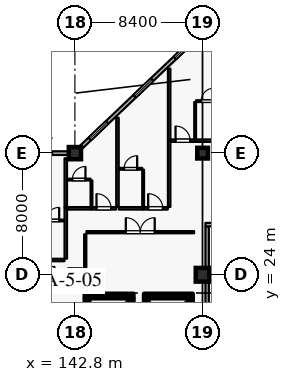
"""IFC4 building model, lengths in metres.
Left out: names, types, materials, properties, quantities, classifications, styles, units other than length and angle.
Written with IfcOpenShell. Run it as: python <this file> out.ifc"""

import sys

from ifc_helpers import new_model, si_unit, direction, frame, frame_2d, origin, origin_2d, place, context, subcontext, project, spatial, rectangle, extrude, element, fill, save


model = new_model("IFC4")
c1 = context("Model", 3, precision=1e-05, world=origin(), true_north=direction((0.0, 1.0)))
c2 = subcontext(c1, "Body", "Model", "MODEL_VIEW")
j1 = project(units=[si_unit("LENGTHUNIT", "METRE"), si_unit("PLANEANGLEUNIT", "RADIAN")], contexts=[c1])
p1 = place(None, origin())
s1 = spatial("IfcSite", under=j1, at=p1, CompositionType="ELEMENT")
p2 = place(p1, origin())
s2 = spatial("IfcBuilding", under=s1, at=p2, CompositionType="ELEMENT")
p3 = place(p2, frame((0.0, 0.0, 21.0)))
s3 = spatial("IfcBuildingStorey", under=s2, at=p3, CompositionType="ELEMENT", Elevation=21.0)
p4 = place(p3, frame((142.8, 32.0, 0.0), z_axis=(0.0, 0.0, 1.0), x_axis=(1.0, 0.0, 0.0)))
e1 = element("IfcColumn", 1, at=p4, inside=s3, PredefinedType="COLUMN", context=c2, shape_type="SweptSolid", body=[
    extrude(rectangle(XDim=0.8, YDim=0.8, at=origin_2d()), origin(), (0.0, 0.0, 1.0), 4.2),
])
p5 = place(p3, frame((151.2, 24.0, 0.0), z_axis=(0.0, 0.0, 1.0), x_axis=(1.0, 0.0, 0.0)))
e2 = element("IfcColumn", 2, at=p5, inside=s3, PredefinedType="COLUMN", context=c2, shape_type="SweptSolid", body=[
    extrude(rectangle(XDim=0.9, YDim=0.9, at=origin_2d()), origin(), (0.0, 0.0, 1.0), 4.2),
])
for number, where, z_axis, x_axis in (
    (3, (142.8, 24.0, 0.0), (0.0, 0.0, 1.0), (1.0, 0.0, 0.0)),
    (4, (151.2, 32.0, 0.0), (0.0, 0.0, 1.0), (1.0, 0.0, 0.0)),
):
    element("IfcColumn", number, at=place(p3, frame(where, z_axis=z_axis, x_axis=x_axis)), inside=s3, PredefinedType="COLUMN", context=c2, shape_type="SweptSolid", body=[
        extrude(rectangle(XDim=0.7, YDim=0.7, at=origin_2d()), origin(), (0.0, 0.0, 1.0), 4.2),
    ])
p6 = place(p3, frame((134.8, 32.0, 0.0), z_axis=(0.0, 0.0, 1.0), x_axis=(1.0, 0.0, 0.0)))
e5 = element("IfcWall", 5, at=p6, inside=s3, PredefinedType="SOLIDWALL", context=c2, shape_type="SweptSolid", body=[
    extrude(rectangle(XDim=7.6, YDim=0.24, at=frame_2d((3.8, 0.0))), origin(), (0.0, 0.0, 1.0), 3.53),
])
p7 = place(p6, frame((1.5, 0.0, 0.8)))
e6 = element("IfcOpeningElement", 6, at=p7, cuts=e5, PredefinedType="OPENING", context=c2, shape_type="SweptSolid", body=[
    extrude(rectangle(XDim=1.6, YDim=1.6, at=frame_2d((0.8, 0.8))), frame((0.0, 0.13, 0.0), z_axis=(0.0, -1.0, 0.0), x_axis=(1.0, 0.0, 0.0)), (0.0, 0.0, 1.0), 0.26),
])
p8 = place(p6, frame((4.9, 0.0, 0.8)))
e7 = element("IfcOpeningElement", 7, at=p8, cuts=e5, PredefinedType="OPENING", context=c2, shape_type="SweptSolid", body=[
    extrude(rectangle(XDim=1.6, YDim=1.6, at=frame_2d((0.8, 0.8))), frame((0.0, 0.13, 0.0), z_axis=(0.0, -1.0, 0.0), x_axis=(1.0, 0.0, 0.0)), (0.0, 0.0, 1.0), 0.26),
])
p9 = place(p3, frame((143.2, 32.381, 0.0), z_axis=(0.0, 0.0, 1.0), x_axis=(0.724156739794, 0.689635422677, 0.0)))
e8 = element("IfcWall", 8, at=p9, inside=s3, PredefinedType="SOLIDWALL", context=c2, shape_type="SweptSolid", body=[
    extrude(rectangle(XDim=10.495, YDim=0.24, at=frame_2d((5.248, 0.0))), origin(), (0.0, 0.0, 1.0), 3.53),
])
p10 = place(p9, frame((0.788, 0.0, 0.8)))
e9 = element("IfcOpeningElement", 9, at=p10, cuts=e8, PredefinedType="OPENING", context=c2, shape_type="SweptSolid", body=[
    extrude(rectangle(XDim=1.6, YDim=1.6, at=frame_2d((0.8, 0.8))), frame((0.0, 0.13, 0.0), z_axis=(0.0, -1.0, 0.0), x_axis=(1.0, 0.0, 0.0)), (0.0, 0.0, 1.0), 0.26),
])
p11 = place(p9, frame((4.862, 0.0, 0.8)))
e10 = element("IfcOpeningElement", 10, at=p11, cuts=e8, PredefinedType="OPENING", context=c2, shape_type="SweptSolid", body=[
    extrude(rectangle(XDim=1.6, YDim=1.6, at=frame_2d((0.8, 0.8))), frame((0.0, 0.13, 0.0), z_axis=(0.0, -1.0, 0.0), x_axis=(1.0, 0.0, 0.0)), (0.0, 0.0, 1.0), 0.26),
])
p12 = place(p9, frame((8.521, 0.0, 0.8)))
e11 = element("IfcOpeningElement", 11, at=p12, cuts=e8, PredefinedType="OPENING", context=c2, shape_type="SweptSolid", body=[
    extrude(rectangle(XDim=1.6, YDim=1.6, at=frame_2d((0.8, 0.8))), frame((0.0, 0.13, 0.0), z_axis=(0.0, -1.0, 0.0), x_axis=(1.0, 0.0, 0.0)), (0.0, 0.0, 1.0), 0.26),
])
p13 = place(p3, frame((146.5, 19.755, 0.0), z_axis=(0.0, 0.0, 1.0), x_axis=(0.0, 1.0, 0.0)))
e12 = element("IfcWall", 12, at=p13, inside=s3, PredefinedType="SHEAR", context=c2, shape_type="SweptSolid", body=[
    extrude(rectangle(XDim=2.69, YDim=0.3, at=frame_2d((1.345, 0.0))), origin(), (0.0, 0.0, 1.0), 3.965),
])
p14 = place(p3, frame((146.65, 22.6, 0.0), z_axis=(0.0, 0.0, 1.0), x_axis=(-1.0, 0.0, 0.0)))
e13 = element("IfcWall", 13, at=p14, inside=s3, PredefinedType="SHEAR", context=c2, shape_type="SweptSolid", body=[
    extrude(rectangle(XDim=3.2, YDim=0.3, at=frame_2d((1.6, 0.0))), origin(), (0.0, 0.0, 1.0), 3.965),
])
for number, where, z_axis, x_axis in (
    (14, (143.6, 22.445, 0.0), (0.0, 0.0, 1.0), (0.0, -1.0, 0.0)),
    (15, (150.4, 19.755, 0.0), (0.0, 0.0, 1.0), (0.0, 1.0, 0.0)),
):
    element("IfcWall", number, at=place(p3, frame(where, z_axis=z_axis, x_axis=x_axis)), inside=s3, PredefinedType="SHEAR", context=c2, shape_type="SweptSolid", body=[
        extrude(rectangle(XDim=2.69, YDim=0.3, at=frame_2d((1.345, 0.0))), origin(), (0.0, 0.0, 1.0), 3.965),
    ])
p15 = place(p3, frame((150.55, 22.6, 0.0), z_axis=(0.0, 0.0, 1.0), x_axis=(-1.0, 0.0, 0.0)))
e16 = element("IfcWall", 16, at=p15, inside=s3, PredefinedType="SHEAR", context=c2, shape_type="SweptSolid", body=[
    extrude(rectangle(XDim=3.2, YDim=0.3, at=frame_2d((1.6, 0.0))), origin(), (0.0, 0.0, 1.0), 3.965),
])
p16 = place(p3, frame((147.5, 22.445, 0.0), z_axis=(0.0, 0.0, 1.0), x_axis=(0.0, -1.0, 0.0)))
e17 = element("IfcWall", 17, at=p16, inside=s3, PredefinedType="SHEAR", context=c2, shape_type="SweptSolid", body=[
    extrude(rectangle(XDim=2.69, YDim=0.3, at=frame_2d((1.345, 0.0))), origin(), (0.0, 0.0, 1.0), 3.965),
])
p17 = place(p3, frame((151.5, 21.365, 0.0), z_axis=(0.0, 0.0, 1.0), x_axis=(0.0, 1.0, 0.0)))
e18 = element("IfcWall", 18, at=p17, inside=s3, PredefinedType="PARTITIONING", context=c2, shape_type="SweptSolid", body=[
    extrude(rectangle(XDim=5.82, YDim=0.22, at=frame_2d((2.91, 0.0))), origin(), (0.0, 0.0, 1.0), 3.965),
])
p18 = place(p3, frame((151.39, 27.3, 0.0), z_axis=(0.0, 0.0, 1.0), x_axis=(1.0, 0.0, 0.0)))
e19 = element("IfcWall", 19, at=p18, inside=s3, PredefinedType="PARTITIONING", context=c2, shape_type="SweptSolid", body=[
    extrude(rectangle(XDim=3.82, YDim=0.22, at=frame_2d((1.91, 0.0))), origin(), (0.0, 0.0, 1.0), 3.965),
])
p19 = place(p18, frame((1.35, 0.0, 0.0)))
e20 = element("IfcOpeningElement", 20, at=p19, cuts=e19, PredefinedType="OPENING", context=c2, shape_type="SweptSolid", body=[
    extrude(rectangle(XDim=1.12, YDim=2.2, at=frame_2d((0.56, 1.1))), frame((0.0, 0.12, 0.0), z_axis=(0.0, -1.0, 0.0), x_axis=(1.0, 0.0, 0.0)), (0.0, 0.0, 1.0), 0.24),
])
p20 = place(p3, frame((140.52, 24.97, 0.0), z_axis=(0.0, 0.0, 1.0), x_axis=(1.0, 0.0, 0.0)))
e21 = element("IfcWall", 21, at=p20, inside=s3, PredefinedType="PARTITIONING", context=c2, shape_type="SweptSolid", body=[
    extrude(rectangle(XDim=1.59, YDim=0.16, at=frame_2d((0.795, 0.0))), origin(), (0.0, 0.0, 1.0), 3.965),
])
p21 = place(p3, frame((140.57, 27.57, 0.0), z_axis=(0.0, 0.0, 1.0), x_axis=(1.0, 0.0, 0.0)))
e22 = element("IfcWall", 22, at=p21, inside=s3, PredefinedType="PARTITIONING", context=c2, shape_type="SweptSolid", body=[
    extrude(rectangle(XDim=1.53, YDim=0.115, at=frame_2d((0.765, 0.0))), origin(), (0.0, 0.0, 1.0), 3.965),
])
p22 = place(p21, frame((0.335, 0.0, 0.0)))
e23 = element("IfcOpeningElement", 23, at=p22, cuts=e22, PredefinedType="OPENING", context=c2, shape_type="SweptSolid", body=[
    extrude(rectangle(XDim=0.86, YDim=2.12, at=frame_2d((0.43, 1.06))), frame((0.0, 0.067, 0.0), z_axis=(0.0, -1.0, 0.0), x_axis=(1.0, 0.0, 0.0)), (0.0, 0.0, 1.0), 0.135),
])
p23 = place(p3, frame((142.2, 25.06, 0.0), z_axis=(0.0, 0.0, 1.0), x_axis=(0.0, 1.0, 0.0)))
e24 = element("IfcWall", 24, at=p23, inside=s3, PredefinedType="PARTITIONING", context=c2, shape_type="SweptSolid", body=[
    extrude(rectangle(XDim=3.39, YDim=0.16, at=frame_2d((1.695, 0.0))), origin(), (0.0, 0.0, 1.0), 3.965),
])
p24 = place(p3, frame((142.29, 28.37, 0.0), z_axis=(0.0, 0.0, 1.0), x_axis=(1.0, 0.0, 0.0)))
e25 = element("IfcWall", 25, at=p24, inside=s3, PredefinedType="PARTITIONING", context=c2, shape_type="SweptSolid", body=[
    extrude(rectangle(XDim=1.59, YDim=0.16, at=frame_2d((0.795, 0.0))), origin(), (0.0, 0.0, 1.0), 3.965),
])
p25 = place(p3, frame((143.89, 28.37, 0.0), z_axis=(0.0, 0.0, 1.0), x_axis=(1.0, 0.0, 0.0)))
e26 = element("IfcWall", 26, at=p25, inside=s3, PredefinedType="PARTITIONING", context=c2, shape_type="SweptSolid", body=[
    extrude(rectangle(XDim=1.62, YDim=0.16, at=frame_2d((0.81, 0.0))), origin(), (0.0, 0.0, 1.0), 3.965),
])
p26 = place(p25, frame((0.33, 0.0, 0.0)))
e27 = element("IfcOpeningElement", 27, at=p26, cuts=e26, PredefinedType="OPENING", context=c2, shape_type="SweptSolid", body=[
    extrude(rectangle(XDim=0.96, YDim=2.2, at=frame_2d((0.48, 1.1))), frame((0.0, 0.09, 0.0), z_axis=(0.0, -1.0, 0.0), x_axis=(1.0, 0.0, 0.0)), (0.0, 0.0, 1.0), 0.18),
])
p27 = place(p3, frame((143.89, 28.46, 0.0), z_axis=(0.0, 0.0, 1.0), x_axis=(0.0, 1.0, 0.0)))
e28 = element("IfcWall", 28, at=p27, inside=s3, PredefinedType="PARTITIONING", context=c2, shape_type="SweptSolid", body=[
    extrude(rectangle(XDim=1.74, YDim=0.115, at=frame_2d((0.87, 0.0))), origin(), (0.0, 0.0, 1.0), 3.965),
])
p28 = place(p3, frame((142.3, 30.26, 0.0), z_axis=(0.0, 0.0, 1.0), x_axis=(1.0, 0.0, 0.0)))
e29 = element("IfcWall", 29, at=p28, inside=s3, PredefinedType="PARTITIONING", context=c2, shape_type="SweptSolid", body=[
    extrude(rectangle(XDim=1.53, YDim=0.115, at=frame_2d((0.765, 0.0))), origin(), (0.0, 0.0, 1.0), 3.965),
])
p29 = place(p28, frame((0.335, 0.0, 0.0)))
e30 = element("IfcOpeningElement", 30, at=p29, cuts=e29, PredefinedType="OPENING", context=c2, shape_type="SweptSolid", body=[
    extrude(rectangle(XDim=0.86, YDim=2.12, at=frame_2d((0.43, 1.06))), frame((0.0, 0.067, 0.0), z_axis=(0.0, -1.0, 0.0), x_axis=(1.0, 0.0, 0.0)), (0.0, 0.0, 1.0), 0.135),
])
p30 = place(p3, frame((142.2, 28.46, 0.0), z_axis=(0.0, 0.0, 1.0), x_axis=(0.0, 1.0, 0.0)))
e31 = element("IfcWall", 31, at=p30, inside=s3, PredefinedType="PARTITIONING", context=c2, shape_type="SweptSolid", body=[
    extrude(rectangle(XDim=3.2, YDim=0.16, at=frame_2d((1.6, 0.0))), origin(), (0.0, 0.0, 1.0), 3.965),
])
p31 = place(p3, frame((145.69, 28.37, 0.0), z_axis=(0.0, 0.0, 1.0), x_axis=(1.0, 0.0, 0.0)))
e32 = element("IfcWall", 32, at=p31, inside=s3, PredefinedType="PARTITIONING", context=c2, shape_type="SweptSolid", body=[
    extrude(rectangle(XDim=1.59, YDim=0.16, at=frame_2d((0.795, 0.0))), origin(), (0.0, 0.0, 1.0), 3.965),
])
p32 = place(p3, frame((147.29, 28.37, 0.0), z_axis=(0.0, 0.0, 1.0), x_axis=(1.0, 0.0, 0.0)))
e33 = element("IfcWall", 33, at=p32, inside=s3, PredefinedType="PARTITIONING", context=c2, shape_type="SweptSolid", body=[
    extrude(rectangle(XDim=1.62, YDim=0.16, at=frame_2d((0.81, 0.0))), origin(), (0.0, 0.0, 1.0), 3.965),
])
p33 = place(p32, frame((0.33, 0.0, 0.0)))
e34 = element("IfcOpeningElement", 34, at=p33, cuts=e33, PredefinedType="OPENING", context=c2, shape_type="SweptSolid", body=[
    extrude(rectangle(XDim=0.96, YDim=2.2, at=frame_2d((0.48, 1.1))), frame((0.0, 0.09, 0.0), z_axis=(0.0, -1.0, 0.0), x_axis=(1.0, 0.0, 0.0)), (0.0, 0.0, 1.0), 0.18),
])
p34 = place(p3, frame((147.29, 28.46, 0.0), z_axis=(0.0, 0.0, 1.0), x_axis=(0.0, 1.0, 0.0)))
e35 = element("IfcWall", 35, at=p34, inside=s3, PredefinedType="PARTITIONING", context=c2, shape_type="SweptSolid", body=[
    extrude(rectangle(XDim=2.45, YDim=0.115, at=frame_2d((1.225, 0.0))), origin(), (0.0, 0.0, 1.0), 3.965),
])
p35 = place(p3, frame((145.7, 30.97, 0.0), z_axis=(0.0, 0.0, 1.0), x_axis=(1.0, 0.0, 0.0)))
e36 = element("IfcWall", 36, at=p35, inside=s3, PredefinedType="PARTITIONING", context=c2, shape_type="SweptSolid", body=[
    extrude(rectangle(XDim=1.53, YDim=0.115, at=frame_2d((0.765, 0.0))), origin(), (0.0, 0.0, 1.0), 3.965),
])
p36 = place(p35, frame((0.335, 0.0, 0.0)))
e37 = element("IfcOpeningElement", 37, at=p36, cuts=e36, PredefinedType="OPENING", context=c2, shape_type="SweptSolid", body=[
    extrude(rectangle(XDim=0.86, YDim=2.12, at=frame_2d((0.43, 1.06))), frame((0.0, 0.067, 0.0), z_axis=(0.0, -1.0, 0.0), x_axis=(1.0, 0.0, 0.0)), (0.0, 0.0, 1.0), 0.135),
])
p37 = place(p3, frame((145.6, 28.46, 0.0), z_axis=(0.0, 0.0, 1.0), x_axis=(0.0, 1.0, 0.0)))
e38 = element("IfcWall", 38, at=p37, inside=s3, PredefinedType="PARTITIONING", context=c2, shape_type="SweptSolid", body=[
    extrude(rectangle(XDim=5.87, YDim=0.16, at=frame_2d((2.935, 0.0))), origin(), (0.0, 0.0, 1.0), 3.965),
])
p38 = place(p3, frame((149.0, 28.46, 0.0), z_axis=(0.0, 0.0, 1.0), x_axis=(0.0, 1.0, 0.0)))
e39 = element("IfcWall", 39, at=p38, inside=s3, PredefinedType="PARTITIONING", context=c2, shape_type="SweptSolid", body=[
    extrude(rectangle(XDim=4.44, YDim=0.16, at=frame_2d((2.22, 0.0))), origin(), (0.0, 0.0, 1.0), 3.965),
])
p39 = place(p3, frame((149.09, 32.82, 0.0), z_axis=(0.0, 0.0, 1.0), x_axis=(1.0, 0.0, 0.0)))
e40 = element("IfcWall", 40, at=p39, inside=s3, PredefinedType="PARTITIONING", context=c2, shape_type="SweptSolid", body=[
    extrude(rectangle(XDim=1.62, YDim=0.16, at=frame_2d((0.81, 0.0))), origin(), (0.0, 0.0, 1.0), 3.965),
])
p40 = place(p39, frame((0.33, 0.0, 0.0)))
e41 = element("IfcOpeningElement", 41, at=p40, cuts=e40, PredefinedType="OPENING", context=c2, shape_type="SweptSolid", body=[
    extrude(rectangle(XDim=0.96, YDim=2.2, at=frame_2d((0.48, 1.1))), frame((0.0, 0.09, 0.0), z_axis=(0.0, -1.0, 0.0), x_axis=(1.0, 0.0, 0.0)), (0.0, 0.0, 1.0), 0.18),
])
p41 = place(p3, frame((150.72, 32.82, 0.0), z_axis=(0.0, 0.0, 1.0), x_axis=(1.0, 0.0, 0.0)))
e42 = element("IfcWall", 42, at=p41, inside=s3, PredefinedType="PARTITIONING", context=c2, shape_type="SweptSolid", body=[
    extrude(rectangle(XDim=1.59, YDim=0.16, at=frame_2d((0.795, 0.0))), origin(), (0.0, 0.0, 1.0), 3.965),
])
p42 = place(p3, frame((150.71, 32.91, 0.0), z_axis=(0.0, 0.0, 1.0), x_axis=(0.0, 1.0, 0.0)))
e43 = element("IfcWall", 43, at=p42, inside=s3, PredefinedType="PARTITIONING", context=c2, shape_type="SweptSolid", body=[
    extrude(rectangle(XDim=2.45, YDim=0.115, at=frame_2d((1.225, 0.0))), origin(), (0.0, 0.0, 1.0), 3.965),
])
p43 = place(p3, frame((150.77, 35.42, 0.0), z_axis=(0.0, 0.0, 1.0), x_axis=(1.0, 0.0, 0.0)))
e44 = element("IfcWall", 44, at=p43, inside=s3, PredefinedType="PARTITIONING", context=c2, shape_type="SweptSolid", body=[
    extrude(rectangle(XDim=1.53, YDim=0.115, at=frame_2d((0.765, 0.0))), origin(), (0.0, 0.0, 1.0), 3.965),
])
p44 = place(p43, frame((0.335, 0.0, 0.0)))
e45 = element("IfcOpeningElement", 45, at=p44, cuts=e44, PredefinedType="OPENING", context=c2, shape_type="SweptSolid", body=[
    extrude(rectangle(XDim=0.86, YDim=2.12, at=frame_2d((0.43, 1.06))), frame((0.0, 0.067, 0.0), z_axis=(0.0, -1.0, 0.0), x_axis=(1.0, 0.0, 0.0)), (0.0, 0.0, 1.0), 0.135),
])
p45 = place(p3, frame((149.0, 32.91, 0.0), z_axis=(0.0, 0.0, 1.0), x_axis=(0.0, 1.0, 0.0)))
e46 = element("IfcWall", 46, at=p45, inside=s3, PredefinedType="PARTITIONING", context=c2, shape_type="SweptSolid", body=[
    extrude(rectangle(XDim=4.65, YDim=0.16, at=frame_2d((2.325, 0.0))), origin(), (0.0, 0.0, 1.0), 3.965),
])
p46 = place(p3, frame((138.96, 23.6, 0.0), z_axis=(0.0, 0.0, 1.0), x_axis=(1.0, 0.0, 0.0)))
e47 = element("IfcWall", 47, at=p46, inside=s3, PredefinedType="PARTITIONING", context=c2, shape_type="SweptSolid", body=[
    extrude(rectangle(XDim=3.08, YDim=0.14, at=frame_2d((1.54, 0.0))), origin(), (0.0, 0.0, 1.0), 3.965),
])
p47 = place(p46, frame((0.59, 0.0, 0.0)))
e48 = element("IfcOpeningElement", 48, at=p47, cuts=e47, PredefinedType="OPENING", context=c2, shape_type="SweptSolid", body=[
    extrude(rectangle(XDim=1.9, YDim=2.4, at=frame_2d((0.95, 1.2))), frame((0.0, 0.08, 0.0), z_axis=(0.0, -1.0, 0.0), x_axis=(1.0, 0.0, 0.0)), (0.0, 0.0, 1.0), 0.16),
])
p48 = place(p3, frame((143.56, 26.8, 0.0), z_axis=(0.0, 0.0, 1.0), x_axis=(1.0, 0.0, 0.0)))
e49 = element("IfcWall", 49, at=p48, inside=s3, PredefinedType="PARTITIONING", context=c2, shape_type="SweptSolid", body=[
    extrude(rectangle(XDim=7.08, YDim=0.14, at=frame_2d((3.54, 0.0))), origin(), (0.0, 0.0, 1.0), 3.965),
])
p49 = place(p48, frame((2.59, 0.0, 0.0)))
e50 = element("IfcOpeningElement", 50, at=p49, cuts=e49, PredefinedType="OPENING", context=c2, shape_type="SweptSolid", body=[
    extrude(rectangle(XDim=1.9, YDim=2.4, at=frame_2d((0.95, 1.2))), frame((0.0, 0.08, 0.0), z_axis=(0.0, -1.0, 0.0), x_axis=(1.0, 0.0, 0.0)), (0.0, 0.0, 1.0), 0.16),
])
p50 = place(p3, frame((143.48, 23.45, 0.0), z_axis=(0.0, 0.0, 1.0), x_axis=(0.0, 1.0, 0.0)))
e51 = element("IfcWall", 51, at=p50, inside=s3, PredefinedType="PARTITIONING", context=c2, shape_type="SweptSolid", body=[
    extrude(rectangle(XDim=3.21, YDim=0.14, at=frame_2d((1.605, 0.0))), origin(), (0.0, 0.0, 1.0), 3.965),
])
p51 = place(p10, origin())
e52 = element("IfcWindow", 52, at=p51, inside=s3, PartitioningType="SINGLE_PANEL", PredefinedType="WINDOW", context=c2, shape_type="SweptSolid", body=[
    extrude(rectangle(XDim=1.6, YDim=1.6, at=frame_2d((0.8, 0.8))), frame((0.0, 0.03, 0.0), z_axis=(0.0, -1.0, 0.0), x_axis=(1.0, 0.0, 0.0)), (0.0, 0.0, 1.0), 0.06),
])
fill(e9, e52)
p52 = place(p11, origin())
e53 = element("IfcWindow", 53, at=p52, inside=s3, PartitioningType="SINGLE_PANEL", PredefinedType="WINDOW", context=c2, shape_type="SweptSolid", body=[
    extrude(rectangle(XDim=1.6, YDim=1.6, at=frame_2d((0.8, 0.8))), frame((0.0, 0.03, 0.0), z_axis=(0.0, -1.0, 0.0), x_axis=(1.0, 0.0, 0.0)), (0.0, 0.0, 1.0), 0.06),
])
fill(e10, e53)
p53 = place(p12, origin())
e54 = element("IfcWindow", 54, at=p53, inside=s3, PartitioningType="SINGLE_PANEL", PredefinedType="WINDOW", context=c2, shape_type="SweptSolid", body=[
    extrude(rectangle(XDim=1.6, YDim=1.6, at=frame_2d((0.8, 0.8))), frame((0.0, 0.03, 0.0), z_axis=(0.0, -1.0, 0.0), x_axis=(1.0, 0.0, 0.0)), (0.0, 0.0, 1.0), 0.06),
])
fill(e11, e54)
p54 = place(p22, origin())
e55 = element("IfcDoor", 55, at=p54, inside=s3, OperationType="SINGLE_SWING_RIGHT", PredefinedType="DOOR", context=c2, shape_type="SweptSolid", body=[
    extrude(rectangle(XDim=0.86, YDim=2.12, at=frame_2d((0.43, 1.06))), frame((0.0, 0.025, 0.0), z_axis=(0.0, -1.0, 0.0), x_axis=(1.0, 0.0, 0.0)), (0.0, 0.0, 1.0), 0.05),
])
fill(e23, e55)
p55 = place(p26, origin())
e56 = element("IfcDoor", 56, at=p55, inside=s3, OperationType="SINGLE_SWING_LEFT", PredefinedType="DOOR", context=c2, shape_type="SweptSolid", body=[
    extrude(rectangle(XDim=0.96, YDim=2.2, at=frame_2d((0.48, 1.1))), frame((0.0, 0.025, 0.0), z_axis=(0.0, -1.0, 0.0), x_axis=(1.0, 0.0, 0.0)), (0.0, 0.0, 1.0), 0.05),
])
fill(e27, e56)
p56 = place(p29, origin())
e57 = element("IfcDoor", 57, at=p56, inside=s3, OperationType="SINGLE_SWING_RIGHT", PredefinedType="DOOR", context=c2, shape_type="SweptSolid", body=[
    extrude(rectangle(XDim=0.86, YDim=2.12, at=frame_2d((0.43, 1.06))), frame((0.0, 0.025, 0.0), z_axis=(0.0, -1.0, 0.0), x_axis=(1.0, 0.0, 0.0)), (0.0, 0.0, 1.0), 0.05),
])
fill(e30, e57)
p57 = place(p33, origin())
e58 = element("IfcDoor", 58, at=p57, inside=s3, OperationType="SINGLE_SWING_LEFT", PredefinedType="DOOR", context=c2, shape_type="SweptSolid", body=[
    extrude(rectangle(XDim=0.96, YDim=2.2, at=frame_2d((0.48, 1.1))), frame((0.0, 0.025, 0.0), z_axis=(0.0, -1.0, 0.0), x_axis=(1.0, 0.0, 0.0)), (0.0, 0.0, 1.0), 0.05),
])
fill(e34, e58)
p58 = place(p36, origin())
e59 = element("IfcDoor", 59, at=p58, inside=s3, OperationType="SINGLE_SWING_RIGHT", PredefinedType="DOOR", context=c2, shape_type="SweptSolid", body=[
    extrude(rectangle(XDim=0.86, YDim=2.12, at=frame_2d((0.43, 1.06))), frame((0.0, 0.025, 0.0), z_axis=(0.0, -1.0, 0.0), x_axis=(1.0, 0.0, 0.0)), (0.0, 0.0, 1.0), 0.05),
])
fill(e37, e59)
p59 = place(p40, origin())
e60 = element("IfcDoor", 60, at=p59, inside=s3, OperationType="SINGLE_SWING_LEFT", PredefinedType="DOOR", context=c2, shape_type="SweptSolid", body=[
    extrude(rectangle(XDim=0.96, YDim=2.2, at=frame_2d((0.48, 1.1))), frame((0.0, 0.025, 0.0), z_axis=(0.0, -1.0, 0.0), x_axis=(1.0, 0.0, 0.0)), (0.0, 0.0, 1.0), 0.05),
])
fill(e41, e60)
p60 = place(p44, origin())
e61 = element("IfcDoor", 61, at=p60, inside=s3, OperationType="SINGLE_SWING_RIGHT", PredefinedType="DOOR", context=c2, shape_type="SweptSolid", body=[
    extrude(rectangle(XDim=0.86, YDim=2.12, at=frame_2d((0.43, 1.06))), frame((0.0, 0.025, 0.0), z_axis=(0.0, -1.0, 0.0), x_axis=(1.0, 0.0, 0.0)), (0.0, 0.0, 1.0), 0.05),
])
fill(e45, e61)
p61 = place(p47, origin())
e62 = element("IfcDoor", 62, at=p61, inside=s3, OperationType="DOUBLE_DOOR_SINGLE_SWING", PredefinedType="DOOR", context=c2, shape_type="SweptSolid", body=[
    extrude(rectangle(XDim=1.9, YDim=2.4, at=frame_2d((0.95, 1.2))), frame((0.0, 0.025, 0.0), z_axis=(0.0, -1.0, 0.0), x_axis=(1.0, 0.0, 0.0)), (0.0, 0.0, 1.0), 0.05),
])
fill(e48, e62)
p62 = place(p49, origin())
e63 = element("IfcDoor", 63, at=p62, inside=s3, OperationType="DOUBLE_DOOR_SINGLE_SWING", PredefinedType="DOOR", context=c2, shape_type="SweptSolid", body=[
    extrude(rectangle(XDim=1.9, YDim=2.4, at=frame_2d((0.95, 1.2))), frame((0.0, 0.025, 0.0), z_axis=(0.0, -1.0, 0.0), x_axis=(1.0, 0.0, 0.0)), (0.0, 0.0, 1.0), 0.05),
])
fill(e50, e63)
save(model, sys.argv[1])
